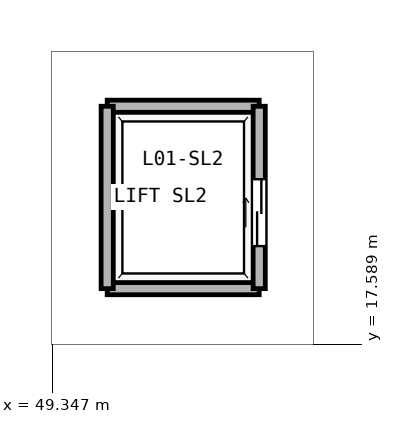
"""IFC4 building model, lengths in metres.
Left out: names, types, materials, properties, quantities, classifications, styles, units other than length and angle.
Written with IfcOpenShell. Run it as: python <this file> out.ifc"""

import sys

from ifc_helpers import new_model, si_unit, direction, frame, frame_2d, origin, place, context, subcontext, project, spatial, rectangle, extrude, element, fill, save


model = new_model("IFC4")
c1 = context("Model", 3, precision=1e-05, world=origin(), true_north=direction((0.0, 1.0)))
c2 = subcontext(c1, "Body", "Model", "MODEL_VIEW")
j1 = project(units=[si_unit("LENGTHUNIT", "METRE"), si_unit("PLANEANGLEUNIT", "RADIAN")], contexts=[c1])
p1 = place(None, origin())
s1 = spatial("IfcSite", under=j1, at=p1, CompositionType="ELEMENT")
p2 = place(p1, origin())
s2 = spatial("IfcBuilding", under=s1, at=p2, CompositionType="ELEMENT")
p3 = place(p2, frame((0.0, 0.0, 4.5)))
s3 = spatial("IfcBuildingStorey", under=s2, at=p3, CompositionType="ELEMENT", Elevation=4.5)
for number, where, z_axis, x_axis in (
    (1, (50.25, 18.5, 0.0), (0.0, 0.0, 1.0), (1.0, 0.0, 0.0)),
    (2, (50.25, 21.5, 0.0), (0.0, 0.0, 1.0), (1.0, 0.0, 0.0)),
):
    element("IfcWall", number, at=place(p3, frame(where, z_axis=z_axis, x_axis=x_axis)), inside=s3, PredefinedType="PARTITIONING", context=c2, shape_type="SweptSolid", body=[
        extrude(rectangle(XDim=2.5, YDim=0.2, at=frame_2d((1.25, 0.0))), origin(), (0.0, 0.0, 1.0), 4.18),
    ])
p4 = place(p3, frame((50.25, 18.5, 0.0), z_axis=(0.0, 0.0, 1.0), x_axis=(0.0, 1.0, 0.0)))
e3 = element("IfcWall", 3, at=p4, inside=s3, PredefinedType="PARTITIONING", context=c2, shape_type="SweptSolid", body=[
    extrude(rectangle(XDim=3.0, YDim=0.2, at=frame_2d((1.5, 0.0))), origin(), (0.0, 0.0, 1.0), 4.18),
])
p5 = place(p3, frame((52.75, 18.5, 0.0), z_axis=(0.0, 0.0, 1.0), x_axis=(0.0, 1.0, 0.0)))
e4 = element("IfcWall", 4, at=p5, inside=s3, PredefinedType="PARTITIONING", context=c2, shape_type="SweptSolid", body=[
    extrude(rectangle(XDim=3.0, YDim=0.2, at=frame_2d((1.5, 0.0))), origin(), (0.0, 0.0, 1.0), 4.18),
])
p6 = place(p5, frame((0.7, 0.0, 0.0)))
e5 = element("IfcOpeningElement", 5, at=p6, cuts=e4, PredefinedType="OPENING", context=c2, shape_type="SweptSolid", body=[
    extrude(rectangle(XDim=1.1, YDim=2.25, at=frame_2d((0.55, 1.125))), frame((0.0, 0.11, 0.0), z_axis=(0.0, -1.0, 0.0), x_axis=(1.0, 0.0, 0.0)), (0.0, 0.0, 1.0), 0.22),
])
p7 = place(p6, origin())
e6 = element("IfcDoor", 6, at=p7, inside=s3, OperationType="DOUBLE_DOOR_SLIDING", PredefinedType="DOOR", context=c2, shape_type="SweptSolid", body=[
    extrude(rectangle(XDim=1.1, YDim=2.25, at=frame_2d((0.55, 1.125))), frame((0.0, 0.025, 0.0), z_axis=(0.0, -1.0, 0.0), x_axis=(1.0, 0.0, 0.0)), (0.0, 0.0, 1.0), 0.05),
])
fill(e5, e6)
save(model, sys.argv[1])
